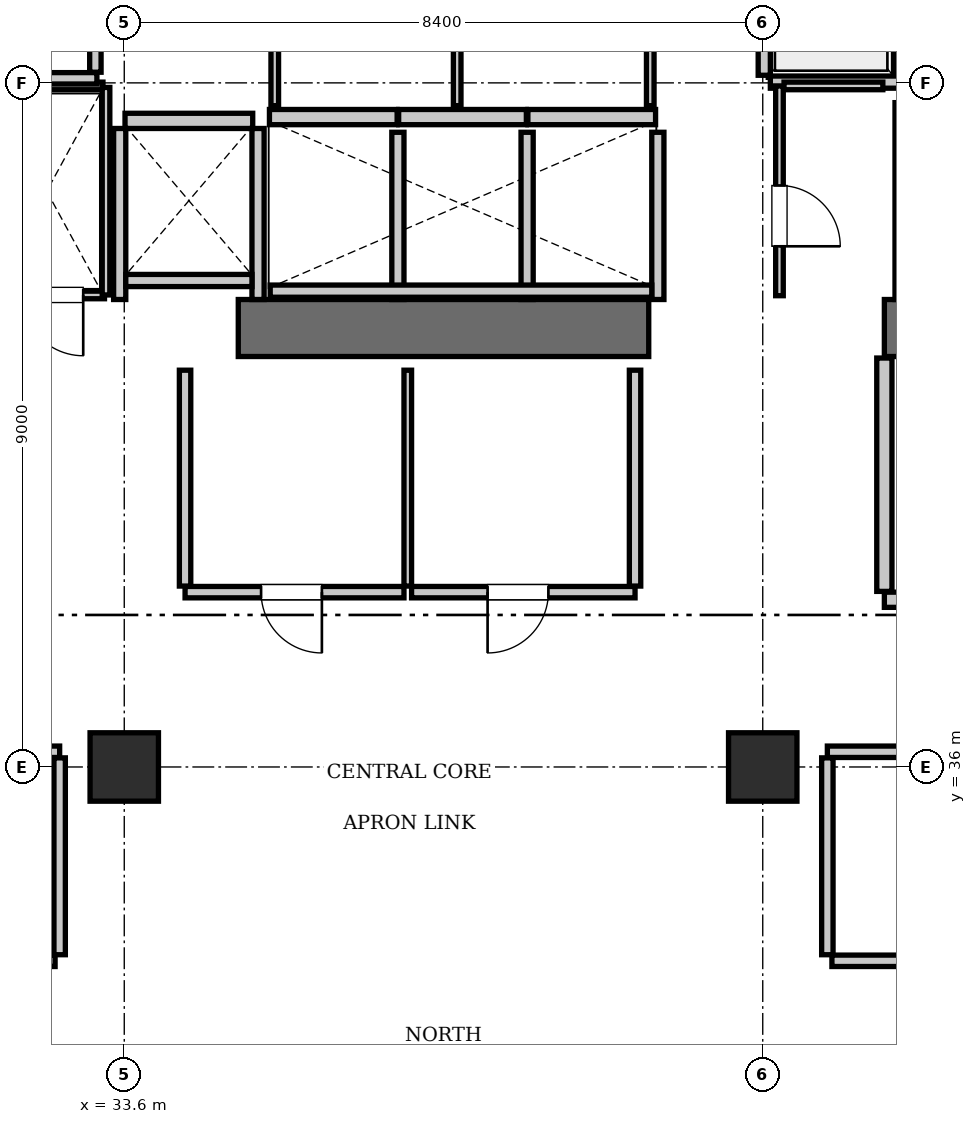
"""IFC4 building model, lengths in metres.
Left out: names, types, materials, properties, quantities, classifications, styles, units other than length and angle.
Written with IfcOpenShell. Run it as: python <this file> out.ifc"""

import sys

from ifc_helpers import new_model, si_unit, direction, frame, frame_2d, origin, origin_2d, place, context, subcontext, project, spatial, rectangle, extrude, element, fill, save


model = new_model("IFC4")
c1 = context("Model", 3, precision=1e-05, world=origin(), true_north=direction((0.0, 1.0)))
c2 = subcontext(c1, "Body", "Model", "MODEL_VIEW")
j1 = project(units=[si_unit("LENGTHUNIT", "METRE"), si_unit("PLANEANGLEUNIT", "RADIAN")], contexts=[c1])
p1 = place(None, origin())
s1 = spatial("IfcSite", under=j1, at=p1, CompositionType="ELEMENT")
p2 = place(p1, origin())
s2 = spatial("IfcBuilding", under=s1, at=p2, CompositionType="ELEMENT")
p3 = place(p2, frame((0.0, 0.0, 192.85)))
s3 = spatial("IfcBuildingStorey", under=s2, at=p3, CompositionType="ELEMENT", Elevation=192.85)
p4 = place(p3, frame((35.1, 41.775, 0.0), z_axis=(0.0, 0.0, 1.0), x_axis=(1.0, 0.0, 0.0)))
e1 = element("IfcWall", 1, at=p4, inside=s3, PredefinedType="SHEAR", context=c2, shape_type="SweptSolid", body=[
    extrude(rectangle(XDim=5.4, YDim=0.75, at=frame_2d((2.7, 0.0))), origin(), (0.0, 0.0, 1.0), 3.85),
])
p5 = place(p3, frame((43.6, 41.775, 0.0), z_axis=(0.0, 0.0, 1.0), x_axis=(1.0, 0.0, 0.0)))
e2 = element("IfcWall", 2, at=p5, inside=s3, PredefinedType="SHEAR", context=c2, shape_type="SweptSolid", body=[
    extrude(rectangle(XDim=6.8, YDim=0.75, at=frame_2d((3.4, 0.0))), origin(), (0.0, 0.0, 1.0), 3.85),
])
p6 = place(p5, frame((3.9, 0.0, 0.0)))
e3 = element("IfcOpeningElement", 3, at=p6, cuts=e2, PredefinedType="OPENING", context=c2, shape_type="SweptSolid", body=[
    extrude(rectangle(XDim=1.15, YDim=2.15, at=frame_2d((0.575, 1.075))), frame((0.0, 0.385, 0.0), z_axis=(0.0, -1.0, 0.0), x_axis=(1.0, 0.0, 0.0)), (0.0, 0.0, 1.0), 0.77),
])
p7 = place(p5, frame((0.55, 0.0, 0.0)))
e4 = element("IfcOpeningElement", 4, at=p7, cuts=e2, PredefinedType="OPENING", context=c2, shape_type="SweptSolid", body=[
    extrude(rectangle(XDim=1.1, YDim=2.2, at=frame_2d((0.55, 1.1))), frame((0.0, 0.385, 0.0), z_axis=(0.0, -1.0, 0.0), x_axis=(1.0, 0.0, 0.0)), (0.0, 0.0, 1.0), 0.77),
])
for number, where, z_axis, x_axis in (
    (5, (33.6, 36.0, 0.0), (0.0, 0.0, 1.0), (1.0, 0.0, 0.0)),
    (6, (42.0, 36.0, 0.0), (0.0, 0.0, 1.0), (1.0, 0.0, 0.0)),
):
    element("IfcColumn", number, at=place(p3, frame(where, z_axis=z_axis, x_axis=x_axis)), inside=s3, PredefinedType="COLUMN", context=c2, shape_type="SweptSolid", body=[
        extrude(rectangle(XDim=0.9, YDim=0.9, at=origin_2d()), origin(), (0.0, 0.0, 1.0), 3.85),
    ])
for number, where, z_axis, x_axis in (
    (7, (35.51, 44.55, 0.0), (0.0, 0.0, 1.0), (1.0, 0.0, 0.0)),
    (8, (37.21, 44.55, 0.0), (0.0, 0.0, 1.0), (1.0, 0.0, 0.0)),
):
    element("IfcWall", number, at=place(p3, frame(where, z_axis=z_axis, x_axis=x_axis)), inside=s3, PredefinedType="SOLIDWALL", context=c2, shape_type="SweptSolid", body=[
        extrude(rectangle(XDim=1.68, YDim=0.2, at=frame_2d((0.84, 0.0))), origin(), (0.0, 0.0, 1.0), 3.61),
    ])
p8 = place(p3, frame((38.91, 44.55, 0.0), z_axis=(0.0, 0.0, 1.0), x_axis=(1.0, 0.0, 0.0)))
e9 = element("IfcWall", 9, at=p8, inside=s3, PredefinedType="SOLIDWALL", context=c2, shape_type="SweptSolid", body=[
    extrude(rectangle(XDim=1.68, YDim=0.2, at=frame_2d((0.84, 0.0))), origin(), (0.0, 0.0, 1.0), 3.61),
])
p9 = place(p3, frame((33.61, 44.5, 0.0), z_axis=(0.0, 0.0, 1.0), x_axis=(1.0, 0.0, 0.0)))
e10 = element("IfcWall", 10, at=p9, inside=s3, PredefinedType="SOLIDWALL", context=c2, shape_type="SweptSolid", body=[
    extrude(rectangle(XDim=1.68, YDim=0.2, at=frame_2d((0.84, 0.0))), origin(), (0.0, 0.0, 1.0), 3.61),
])
p10 = place(p3, frame((43.82, 42.15, 0.0), z_axis=(0.0, 0.0, 1.0), x_axis=(0.0, 1.0, 0.0)))
e11 = element("IfcWall", 11, at=p10, inside=s3, PredefinedType="SOLIDWALL", context=c2, shape_type="SweptSolid", body=[
    extrude(rectangle(XDim=2.59, YDim=0.16, at=frame_2d((1.295, 0.0))), origin(), (0.0, 0.0, 1.0), 3.61),
])
for number, where, z_axis, x_axis in (
    (12, (42.02, 45.1, 0.0), (0.0, 0.0, 1.0), (0.0, 1.0, 0.0)),
    (13, (43.8, 45.1, 0.0), (0.0, 0.0, 1.0), (0.0, 1.0, 0.0)),
):
    element("IfcWall", number, at=place(p3, frame(where, z_axis=z_axis, x_axis=x_axis)), inside=s3, PredefinedType="SOLIDWALL", context=c2, shape_type="SweptSolid", body=[
        extrude(rectangle(XDim=1.95, YDim=0.16, at=frame_2d((0.975, 0.0))), origin(), (0.0, 0.0, 1.0), 3.61),
    ])
p11 = place(p3, frame((42.1, 45.01, 0.0), z_axis=(0.0, 0.0, 1.0), x_axis=(1.0, 0.0, 0.0)))
e14 = element("IfcWall", 14, at=p11, inside=s3, PredefinedType="SOLIDWALL", context=c2, shape_type="SweptSolid", body=[
    extrude(rectangle(XDim=3.45, YDim=0.16, at=frame_2d((1.725, 0.0))), origin(), (0.0, 0.0, 1.0), 3.61),
])
for number, where, z_axis, x_axis in (
    (15, (37.2, 42.15, 0.0), (0.0, 0.0, 1.0), (0.0, 1.0, 0.0)),
    (16, (38.9, 42.15, 0.0), (0.0, 0.0, 1.0), (0.0, 1.0, 0.0)),
    (17, (40.62, 42.15, 0.0), (0.0, 0.0, 1.0), (0.0, 1.0, 0.0)),
):
    element("IfcWall", number, at=place(p3, frame(where, z_axis=z_axis, x_axis=x_axis)), inside=s3, PredefinedType="SOLIDWALL", context=c2, shape_type="SweptSolid", body=[
        extrude(rectangle(XDim=2.2, YDim=0.16, at=frame_2d((1.1, 0.0))), origin(), (0.0, 0.0, 1.0), 3.61),
    ])
p12 = place(p3, frame((35.52, 42.26, 0.0), z_axis=(0.0, 0.0, 1.0), x_axis=(1.0, 0.0, 0.0)))
e18 = element("IfcWall", 18, at=p12, inside=s3, PredefinedType="SOLIDWALL", context=c2, shape_type="SweptSolid", body=[
    extrude(rectangle(XDim=5.02, YDim=0.16, at=frame_2d((2.51, 0.0))), origin(), (0.0, 0.0, 1.0), 3.61),
])
for number, where, z_axis, x_axis in (
    (19, (33.54, 42.15, 0.0), (0.0, 0.0, 1.0), (0.0, 1.0, 0.0)),
    (20, (35.36, 42.15, 0.0), (0.0, 0.0, 1.0), (0.0, 1.0, 0.0)),
):
    element("IfcWall", number, at=place(p3, frame(where, z_axis=z_axis, x_axis=x_axis)), inside=s3, PredefinedType="SOLIDWALL", context=c2, shape_type="SweptSolid", body=[
        extrude(rectangle(XDim=2.25, YDim=0.16, at=frame_2d((1.125, 0.0))), origin(), (0.0, 0.0, 1.0), 3.61),
    ])
p13 = place(p3, frame((33.62, 42.4, 0.0), z_axis=(0.0, 0.0, 1.0), x_axis=(1.0, 0.0, 0.0)))
e21 = element("IfcWall", 21, at=p13, inside=s3, PredefinedType="SOLIDWALL", context=c2, shape_type="SweptSolid", body=[
    extrude(rectangle(XDim=1.66, YDim=0.16, at=frame_2d((0.83, 0.0))), origin(), (0.0, 0.0, 1.0), 3.61),
])
p14 = place(p3, frame((43.6, 38.2, 0.0), z_axis=(0.0, 0.0, 1.0), x_axis=(1.0, 0.0, 0.0)))
e22 = element("IfcWall", 22, at=p14, inside=s3, PredefinedType="PARTITIONING", context=c2, shape_type="SweptSolid", body=[
    extrude(rectangle(XDim=5.8, YDim=0.2, at=frame_2d((2.9, 0.0))), origin(), (0.0, 0.0, 1.0), 3.61),
])
p15 = place(p14, frame((2.3, 0.0, 0.0)))
e23 = element("IfcOpeningElement", 23, at=p15, cuts=e22, PredefinedType="OPENING", context=c2, shape_type="SweptSolid", body=[
    extrude(rectangle(XDim=1.15, YDim=2.15, at=frame_2d((0.575, 1.075))), frame((0.0, 0.11, 0.0), z_axis=(0.0, -1.0, 0.0), x_axis=(1.0, 0.0, 0.0)), (0.0, 0.0, 1.0), 0.22),
])
p16 = place(p3, frame((43.6, 38.31, 0.0), z_axis=(0.0, 0.0, 1.0), x_axis=(0.0, 1.0, 0.0)))
e24 = element("IfcWall", 24, at=p16, inside=s3, PredefinedType="PARTITIONING", context=c2, shape_type="SweptSolid", body=[
    extrude(rectangle(XDim=3.07, YDim=0.2, at=frame_2d((1.535, 0.0))), origin(), (0.0, 0.0, 1.0), 3.61),
])
p17 = place(p3, frame((32.02, 42.21, 0.0), z_axis=(0.0, 0.0, 1.0), x_axis=(1.0, 0.0, 0.0)))
e25 = element("IfcWall", 25, at=p17, inside=s3, PredefinedType="PARTITIONING", context=c2, shape_type="SweptSolid", body=[
    extrude(rectangle(XDim=1.32, YDim=0.1, at=frame_2d((0.66, 0.0))), origin(), (0.0, 0.0, 1.0), 3.61),
])
p18 = place(p17, frame((0.24, 0.0, 0.0)))
e26 = element("IfcOpeningElement", 26, at=p18, cuts=e25, PredefinedType="OPENING", context=c2, shape_type="SweptSolid", body=[
    extrude(rectangle(XDim=0.8, YDim=2.05, at=frame_2d((0.4, 1.025))), frame((0.0, 0.06, 0.0), z_axis=(0.0, -1.0, 0.0), x_axis=(1.0, 0.0, 0.0)), (0.0, 0.0, 1.0), 0.12),
])
p19 = place(p3, frame((31.84, 44.96, 0.0), z_axis=(0.0, 0.0, 1.0), x_axis=(1.0, 0.0, 0.0)))
e27 = element("IfcWall", 27, at=p19, inside=s3, PredefinedType="PARTITIONING", context=c2, shape_type="SweptSolid", body=[
    extrude(rectangle(XDim=1.48, YDim=0.1, at=frame_2d((0.74, 0.0))), origin(), (0.0, 0.0, 1.0), 3.61),
])
p20 = place(p3, frame((33.36, 42.21, 0.0), z_axis=(0.0, 0.0, 1.0), x_axis=(0.0, 1.0, 0.0)))
e28 = element("IfcWall", 28, at=p20, inside=s3, PredefinedType="PARTITIONING", context=c2, shape_type="SweptSolid", body=[
    extrude(rectangle(XDim=2.73, YDim=0.1, at=frame_2d((1.365, 0.0))), origin(), (0.0, 0.0, 1.0), 3.61),
])
for number, where, z_axis, x_axis in (
    (29, (35.58, 44.7, 0.0), (0.0, 0.0, 1.0), (0.0, 1.0, 0.0)),
    (30, (37.98, 44.7, 0.0), (0.0, 0.0, 1.0), (0.0, 1.0, 0.0)),
    (31, (40.52, 44.7, 0.0), (0.0, 0.0, 1.0), (0.0, 1.0, 0.0)),
):
    element("IfcWall", number, at=place(p3, frame(where, z_axis=z_axis, x_axis=x_axis)), inside=s3, PredefinedType="PARTITIONING", context=c2, shape_type="SweptSolid", body=[
        extrude(rectangle(XDim=1.08, YDim=0.1, at=frame_2d((0.54, 0.0))), origin(), (0.0, 0.0, 1.0), 3.61),
    ])
p21 = place(p3, frame((42.22, 42.2, 0.0), z_axis=(0.0, 0.0, 1.0), x_axis=(0.0, 1.0, 0.0)))
e32 = element("IfcWall", 32, at=p21, inside=s3, PredefinedType="PARTITIONING", context=c2, shape_type="SweptSolid", body=[
    extrude(rectangle(XDim=2.76, YDim=0.1, at=frame_2d((1.38, 0.0))), origin(), (0.0, 0.0, 1.0), 3.61),
])
p22 = place(p21, frame((0.65, 0.0, 0.0)))
e33 = element("IfcOpeningElement", 33, at=p22, cuts=e32, PredefinedType="OPENING", context=c2, shape_type="SweptSolid", body=[
    extrude(rectangle(XDim=0.8, YDim=2.05, at=frame_2d((0.4, 1.025))), frame((0.0, 0.06, 0.0), z_axis=(0.0, -1.0, 0.0), x_axis=(1.0, 0.0, 0.0)), (0.0, 0.0, 1.0), 0.12),
])
p23 = place(p3, frame((42.28, 44.96, 0.0), z_axis=(0.0, 0.0, 1.0), x_axis=(1.0, 0.0, 0.0)))
e34 = element("IfcWall", 34, at=p23, inside=s3, PredefinedType="PARTITIONING", context=c2, shape_type="SweptSolid", body=[
    extrude(rectangle(XDim=1.3, YDim=0.1, at=frame_2d((0.65, 0.0))), origin(), (0.0, 0.0, 1.0), 3.61),
])
p24 = place(p3, frame((30.06, 45.06, 0.0), z_axis=(0.0, 0.0, 1.0), x_axis=(1.0, 0.0, 0.0)))
e35 = element("IfcWall", 35, at=p24, inside=s3, PredefinedType="PARTITIONING", context=c2, shape_type="SweptSolid", body=[
    extrude(rectangle(XDim=3.18, YDim=0.15, at=frame_2d((1.59, 0.0))), origin(), (0.0, 0.0, 1.0), 3.61),
])
p25 = place(p3, frame((33.22, 45.14, 0.0), z_axis=(0.0, 0.0, 1.0), x_axis=(0.0, 1.0, 0.0)))
e36 = element("IfcWall", 36, at=p25, inside=s3, PredefinedType="PARTITIONING", context=c2, shape_type="SweptSolid", body=[
    extrude(rectangle(XDim=4.16, YDim=0.15, at=frame_2d((2.08, 0.0))), origin(), (0.0, 0.0, 1.0), 3.61),
])
p26 = place(p3, frame((34.4, 38.3, 0.0), z_axis=(0.0, 0.0, 1.0), x_axis=(1.0, 0.0, 0.0)))
e37 = element("IfcWall", 37, at=p26, inside=s3, PredefinedType="PARTITIONING", context=c2, shape_type="SweptSolid", body=[
    extrude(rectangle(XDim=2.88, YDim=0.15, at=frame_2d((1.44, 0.0))), origin(), (0.0, 0.0, 1.0), 3.61),
])
p27 = place(p26, frame((1.0, 0.0, 0.0)))
e38 = element("IfcOpeningElement", 38, at=p27, cuts=e37, PredefinedType="OPENING", context=c2, shape_type="SweptSolid", body=[
    extrude(rectangle(XDim=0.8, YDim=2.05, at=frame_2d((0.4, 1.025))), frame((0.0, 0.085, 0.0), z_axis=(0.0, -1.0, 0.0), x_axis=(1.0, 0.0, 0.0)), (0.0, 0.0, 1.0), 0.17),
])
p28 = place(p3, frame((37.38, 38.3, 0.0), z_axis=(0.0, 0.0, 1.0), x_axis=(1.0, 0.0, 0.0)))
e39 = element("IfcWall", 39, at=p28, inside=s3, PredefinedType="PARTITIONING", context=c2, shape_type="SweptSolid", body=[
    extrude(rectangle(XDim=2.94, YDim=0.15, at=frame_2d((1.47, 0.0))), origin(), (0.0, 0.0, 1.0), 3.61),
])
p29 = place(p28, frame((1.0, 0.0, 0.0)))
e40 = element("IfcOpeningElement", 40, at=p29, cuts=e39, PredefinedType="OPENING", context=c2, shape_type="SweptSolid", body=[
    extrude(rectangle(XDim=0.8, YDim=2.05, at=frame_2d((0.4, 1.025))), frame((0.0, 0.085, 0.0), z_axis=(0.0, -1.0, 0.0), x_axis=(1.0, 0.0, 0.0)), (0.0, 0.0, 1.0), 0.17),
])
p30 = place(p3, frame((34.4, 38.38, 0.0), z_axis=(0.0, 0.0, 1.0), x_axis=(0.0, 1.0, 0.0)))
e41 = element("IfcWall", 41, at=p30, inside=s3, PredefinedType="PARTITIONING", context=c2, shape_type="SweptSolid", body=[
    extrude(rectangle(XDim=2.84, YDim=0.15, at=frame_2d((1.42, 0.0))), origin(), (0.0, 0.0, 1.0), 3.61),
])
p31 = place(p3, frame((37.33, 38.38, 0.0), z_axis=(0.0, 0.0, 1.0), x_axis=(0.0, 1.0, 0.0)))
e42 = element("IfcWall", 42, at=p31, inside=s3, PredefinedType="PARTITIONING", context=c2, shape_type="SweptSolid", body=[
    extrude(rectangle(XDim=2.84, YDim=0.1, at=frame_2d((1.42, 0.0))), origin(), (0.0, 0.0, 1.0), 3.61),
])
p32 = place(p3, frame((40.32, 38.38, 0.0), z_axis=(0.0, 0.0, 1.0), x_axis=(0.0, 1.0, 0.0)))
e43 = element("IfcWall", 43, at=p32, inside=s3, PredefinedType="PARTITIONING", context=c2, shape_type="SweptSolid", body=[
    extrude(rectangle(XDim=2.84, YDim=0.15, at=frame_2d((1.42, 0.0))), origin(), (0.0, 0.0, 1.0), 3.61),
])
p33 = place(p3, frame((28.32, 36.2, 0.0), z_axis=(0.0, 0.0, 1.0), x_axis=(1.0, 0.0, 0.0)))
e44 = element("IfcWall", 44, at=p33, inside=s3, PredefinedType="PARTITIONING", context=c2, shape_type="SweptSolid", body=[
    extrude(rectangle(XDim=4.43, YDim=0.15, at=frame_2d((2.215, 0.0))), origin(), (0.0, 0.0, 1.0), 3.61),
])
p34 = place(p3, frame((32.75, 33.53, 0.0), z_axis=(0.0, 0.0, 1.0), x_axis=(0.0, 1.0, 0.0)))
e45 = element("IfcWall", 45, at=p34, inside=s3, PredefinedType="PARTITIONING", context=c2, shape_type="SweptSolid", body=[
    extrude(rectangle(XDim=2.59, YDim=0.15, at=frame_2d((1.295, 0.0))), origin(), (0.0, 0.0, 1.0), 3.61),
])
p35 = place(p3, frame((28.38, 33.45, 0.0), z_axis=(0.0, 0.0, 1.0), x_axis=(1.0, 0.0, 0.0)))
e46 = element("IfcWall", 46, at=p35, inside=s3, PredefinedType="PARTITIONING", context=c2, shape_type="SweptSolid", body=[
    extrude(rectangle(XDim=4.31, YDim=0.15, at=frame_2d((2.155, 0.0))), origin(), (0.0, 0.0, 1.0), 3.61),
])
p36 = place(p35, frame((1.705, 0.0, 0.0)))
e47 = element("IfcOpeningElement", 47, at=p36, cuts=e46, PredefinedType="OPENING", context=c2, shape_type="SweptSolid", body=[
    extrude(rectangle(XDim=0.9, YDim=2.1, at=frame_2d((0.45, 1.05))), frame((0.0, 0.085, 0.0), z_axis=(0.0, -1.0, 0.0), x_axis=(1.0, 0.0, 0.0)), (0.0, 0.0, 1.0), 0.17),
])
p37 = place(p3, frame((42.85, 36.2, 0.0), z_axis=(0.0, 0.0, 1.0), x_axis=(1.0, 0.0, 0.0)))
e48 = element("IfcWall", 48, at=p37, inside=s3, PredefinedType="PARTITIONING", context=c2, shape_type="SweptSolid", body=[
    extrude(rectangle(XDim=4.43, YDim=0.15, at=frame_2d((2.215, 0.0))), origin(), (0.0, 0.0, 1.0), 3.61),
])
p38 = place(p3, frame((42.85, 33.53, 0.0), z_axis=(0.0, 0.0, 1.0), x_axis=(0.0, 1.0, 0.0)))
e49 = element("IfcWall", 49, at=p38, inside=s3, PredefinedType="PARTITIONING", context=c2, shape_type="SweptSolid", body=[
    extrude(rectangle(XDim=2.59, YDim=0.15, at=frame_2d((1.295, 0.0))), origin(), (0.0, 0.0, 1.0), 3.61),
])
p39 = place(p3, frame((42.91, 33.45, 0.0), z_axis=(0.0, 0.0, 1.0), x_axis=(1.0, 0.0, 0.0)))
e50 = element("IfcWall", 50, at=p39, inside=s3, PredefinedType="PARTITIONING", context=c2, shape_type="SweptSolid", body=[
    extrude(rectangle(XDim=4.31, YDim=0.15, at=frame_2d((2.155, 0.0))), origin(), (0.0, 0.0, 1.0), 3.61),
])
p40 = place(p39, frame((1.705, 0.0, 0.0)))
e51 = element("IfcOpeningElement", 51, at=p40, cuts=e50, PredefinedType="OPENING", context=c2, shape_type="SweptSolid", body=[
    extrude(rectangle(XDim=0.9, YDim=2.1, at=frame_2d((0.45, 1.05))), frame((0.0, 0.085, 0.0), z_axis=(0.0, -1.0, 0.0), x_axis=(1.0, 0.0, 0.0)), (0.0, 0.0, 1.0), 0.17),
])
p41 = place(p18, frame((0.8, 0.0, 0.0), z_axis=(0.0, 0.0, 1.0), x_axis=(-1.0, 0.0, 0.0)))
e52 = element("IfcDoor", 52, at=p41, inside=s3, OperationType="SINGLE_SWING_LEFT", PredefinedType="DOOR", context=c2, shape_type="SweptSolid", body=[
    extrude(rectangle(XDim=0.8, YDim=2.05, at=frame_2d((0.4, 1.025))), frame((0.0, 0.025, 0.0), z_axis=(0.0, -1.0, 0.0), x_axis=(1.0, 0.0, 0.0)), (0.0, 0.0, 1.0), 0.05),
])
fill(e26, e52)
p42 = place(p22, frame((0.8, 0.0, 0.0), z_axis=(0.0, 0.0, 1.0), x_axis=(-1.0, 0.0, 0.0)))
e53 = element("IfcDoor", 53, at=p42, inside=s3, OperationType="SINGLE_SWING_RIGHT", PredefinedType="DOOR", context=c2, shape_type="SweptSolid", body=[
    extrude(rectangle(XDim=0.8, YDim=2.05, at=frame_2d((0.4, 1.025))), frame((0.0, 0.025, 0.0), z_axis=(0.0, -1.0, 0.0), x_axis=(1.0, 0.0, 0.0)), (0.0, 0.0, 1.0), 0.05),
])
fill(e33, e53)
p43 = place(p27, frame((0.8, 0.0, 0.0), z_axis=(0.0, 0.0, 1.0), x_axis=(-1.0, 0.0, 0.0)))
e54 = element("IfcDoor", 54, at=p43, inside=s3, OperationType="SINGLE_SWING_LEFT", PredefinedType="DOOR", context=c2, shape_type="SweptSolid", body=[
    extrude(rectangle(XDim=0.8, YDim=2.05, at=frame_2d((0.4, 1.025))), frame((0.0, 0.025, 0.0), z_axis=(0.0, -1.0, 0.0), x_axis=(1.0, 0.0, 0.0)), (0.0, 0.0, 1.0), 0.05),
])
fill(e38, e54)
p44 = place(p29, frame((0.8, 0.0, 0.0), z_axis=(0.0, 0.0, 1.0), x_axis=(-1.0, 0.0, 0.0)))
e55 = element("IfcDoor", 55, at=p44, inside=s3, OperationType="SINGLE_SWING_RIGHT", PredefinedType="DOOR", context=c2, shape_type="SweptSolid", body=[
    extrude(rectangle(XDim=0.8, YDim=2.05, at=frame_2d((0.4, 1.025))), frame((0.0, 0.025, 0.0), z_axis=(0.0, -1.0, 0.0), x_axis=(1.0, 0.0, 0.0)), (0.0, 0.0, 1.0), 0.05),
])
fill(e40, e55)
save(model, sys.argv[1])
